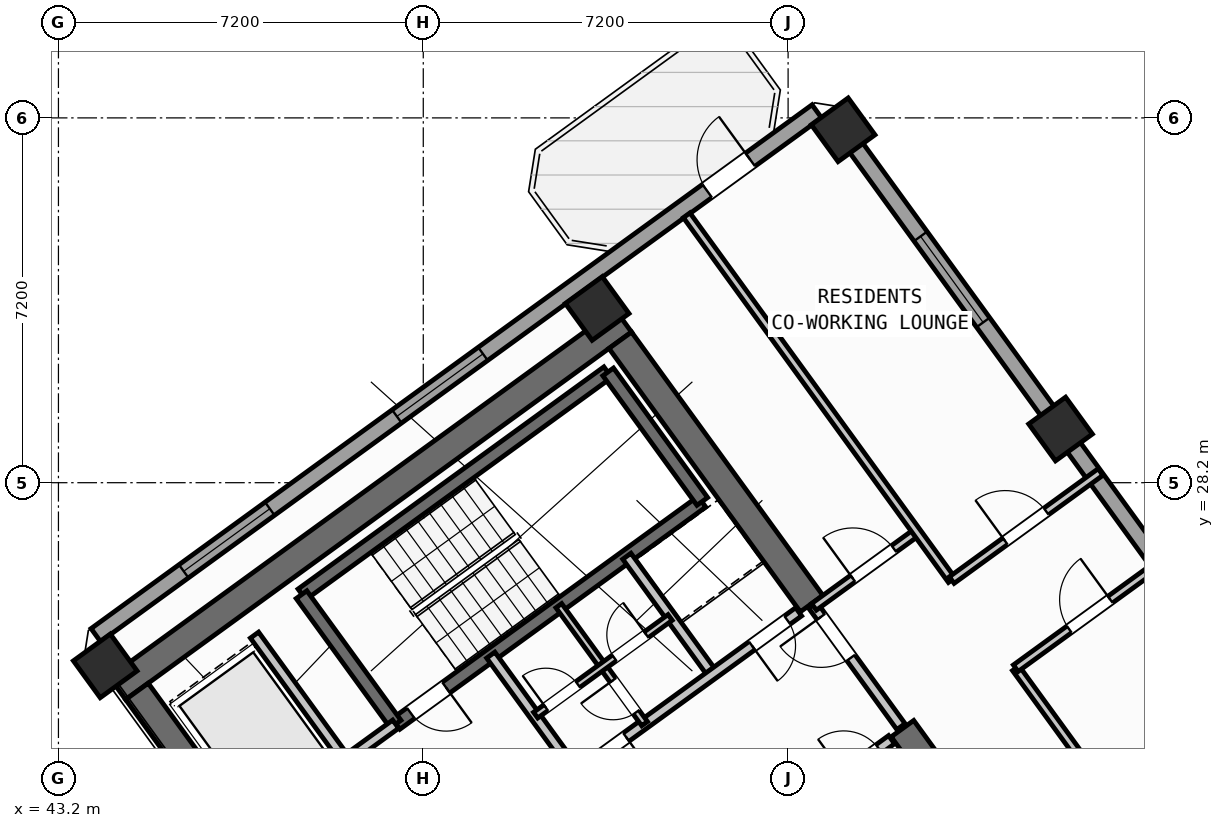
"""IFC4 building model, lengths in metres.
Left out: names, types, materials, properties, quantities, classifications, styles, units other than length and angle.
Written with IfcOpenShell. Run it as: python <this file> out.ifc"""

import sys

from ifc_helpers import new_model, si_unit, direction, frame, frame_2d, origin, origin_2d, place, context, subcontext, project, spatial, rectangle, hollow_rectangle, extrude, source, transform, mapped, element, fill, save


model = new_model("IFC4")
c1 = context("Model", 3, precision=1e-05, world=origin(), true_north=direction((0.0, 1.0)))
c2 = subcontext(c1, "Body", "Model", "MODEL_VIEW")
j1 = project(units=[si_unit("LENGTHUNIT", "METRE"), si_unit("PLANEANGLEUNIT", "RADIAN")], contexts=[c1])
p1 = place(None, origin())
s1 = spatial("IfcSite", under=j1, at=p1, CompositionType="ELEMENT")
p2 = place(p1, origin())
s2 = spatial("IfcBuilding", under=s1, at=p2, CompositionType="ELEMENT")
p3 = place(p2, frame((0.0, 0.0, 144.3)))
s3 = spatial("IfcBuildingStorey", under=s2, at=p3, CompositionType="ELEMENT", Elevation=144.3)
p4 = place(p3, frame((44.365, 24.142, 0.0), z_axis=(0.0, 0.0, 1.0), x_axis=(0.809024304885, 0.587775190107, 0.0)))
e1 = element("IfcWall", 1, at=p4, inside=s3, PredefinedType="SHEAR", context=c2, shape_type="SweptSolid", body=[
    extrude(rectangle(XDim=12.34, YDim=0.55, at=frame_2d((6.17, 0.0))), origin(), (0.0, 0.0, 1.0), 3.35),
])
p5 = place(p3, frame((48.526, 18.884, 0.0), z_axis=(0.0, 0.0, 1.0), x_axis=(-0.587764933797, 0.809031756236, 0.0)))
e2 = element("IfcWall", 2, at=p5, inside=s3, PredefinedType="SHEAR", context=c2, shape_type="SweptSolid", body=[
    extrude(rectangle(XDim=6.425, YDim=0.55, at=frame_2d((3.212, 0.0))), origin(), (0.0, 0.0, 1.0), 3.35),
])
p6 = place(p3, frame((61.958, 20.454, 0.0), z_axis=(0.0, 0.0, 1.0), x_axis=(-0.587802113096, 0.809004744015, 0.0)))
e3 = element("IfcWall", 3, at=p6, inside=s3, PredefinedType="SHEAR", context=c2, shape_type="SweptSolid", body=[
    extrude(rectangle(XDim=3.575, YDim=0.55, at=frame_2d((1.788, 0.0))), origin(), (0.0, 0.0, 1.0), 3.35),
])
p7 = place(p3, frame((58.064, 25.813, 0.0), z_axis=(0.0, 0.0, 1.0), x_axis=(-0.587764933797, 0.809031756236, 0.0)))
e4 = element("IfcWall", 4, at=p7, inside=s3, PredefinedType="SHEAR", context=c2, shape_type="SweptSolid", body=[
    extrude(rectangle(XDim=6.425, YDim=0.55, at=frame_2d((3.212, 0.0))), origin(), (0.0, 0.0, 1.0), 3.35),
])
m1 = source(origin(), c2, "Body", "SweptSolid", [
    extrude(hollow_rectangle(XDim=0.9, YDim=0.9, WallThickness=0.036, at=origin_2d()), origin(), (0.0, 0.0, 1.0), 3.6),
])
for number, where, z_axis, x_axis in (
    (5, (44.124, 24.585, 0.0), (0.0, 0.0, 1.0), (0.809, 0.588, 0.0)),
    (6, (53.832, 31.638, 0.0), (0.0, 0.0, 1.0), (0.809, 0.588, 0.0)),
    (7, (62.977, 29.259, 0.0), (0.0, 0.0, 1.0), (0.809, 0.588, 0.0)),
    (8, (58.686, 35.165, 0.0), (0.0, 0.0, 1.0), (0.809, 0.588, 0.0)),
):
    element("IfcColumn", number, at=place(p3, frame(where, z_axis=z_axis, x_axis=x_axis)), inside=s3, PredefinedType="COLUMN", context=c2, shape_type="MappedRepresentation", body=[
        mapped(m1, transform((0.0, 0.0, 0.0), scale=1.0)),
    ])
p8 = place(p3, frame((43.938, 25.192, 0.0), z_axis=(0.0, 0.0, 1.0), x_axis=(0.809016324578, 0.587786174187, 0.0)))
e9 = element("IfcWall", 9, at=p8, inside=s3, PredefinedType="STANDARD", context=c2, shape_type="SweptSolid", body=[
    extrude(rectangle(XDim=17.587, YDim=0.32, at=frame_2d((8.794, 0.0))), origin(), (0.0, 0.0, 1.0), 3.35),
])
p9 = place(p8, frame((14.914, 0.0, 0.0)))
e10 = element("IfcOpeningElement", 10, at=p9, cuts=e9, PredefinedType="OPENING", context=c2, shape_type="SweptSolid", body=[
    extrude(rectangle(XDim=1.05, YDim=2.15, at=frame_2d((0.525, 1.075))), frame((0.0, 0.17, 0.0), z_axis=(0.0, -1.0, 0.0), x_axis=(1.0, 0.0, 0.0)), (0.0, 0.0, 1.0), 0.34),
])
p10 = place(p8, frame((2.144, 0.0, 0.8)))
e11 = element("IfcOpeningElement", 11, at=p10, cuts=e9, PredefinedType="OPENING", context=c2, shape_type="SweptSolid", body=[
    extrude(rectangle(XDim=2.1, YDim=1.55, at=frame_2d((1.05, 0.775))), frame((0.0, 0.17, 0.0), z_axis=(0.0, -1.0, 0.0), x_axis=(1.0, 0.0, 0.0)), (0.0, 0.0, 1.0), 0.34),
])
p11 = place(p8, frame((7.344, 0.0, 0.8)))
e12 = element("IfcOpeningElement", 12, at=p11, cuts=e9, PredefinedType="OPENING", context=c2, shape_type="SweptSolid", body=[
    extrude(rectangle(XDim=2.1, YDim=1.55, at=frame_2d((1.05, 0.775))), frame((0.0, 0.17, 0.0), z_axis=(0.0, -1.0, 0.0), x_axis=(1.0, 0.0, 0.0)), (0.0, 0.0, 1.0), 0.34),
])
p12 = place(p3, frame((58.455, 35.484, 0.0), z_axis=(0.0, 0.0, 1.0), x_axis=(0.587783625747, -0.809018176127, 0.0)))
e13 = element("IfcWall", 13, at=p12, inside=s3, PredefinedType="STANDARD", context=c2, shape_type="SweptSolid", body=[
    extrude(rectangle(XDim=21.587, YDim=0.32, at=frame_2d((10.794, 0.0))), origin(), (0.0, 0.0, 1.0), 2.775),
])
p13 = place(p12, frame((2.994, 0.0, 0.8)))
e14 = element("IfcOpeningElement", 14, at=p13, cuts=e13, PredefinedType="OPENING", context=c2, shape_type="SweptSolid", body=[
    extrude(rectangle(XDim=2.1, YDim=1.55, at=frame_2d((1.05, 0.775))), frame((0.0, 0.17, 0.0), z_axis=(0.0, -1.0, 0.0), x_axis=(1.0, 0.0, 0.0)), (0.0, 0.0, 1.0), 0.34),
])
p14 = place(p12, frame((11.959, 0.0, 0.85)))
e15 = element("IfcOpeningElement", 15, at=p14, cuts=e13, PredefinedType="OPENING", context=c2, shape_type="SweptSolid", body=[
    extrude(rectangle(XDim=1.8, YDim=1.5, at=frame_2d((0.9, 0.75))), frame((0.0, 0.17, 0.0), z_axis=(0.0, -1.0, 0.0), x_axis=(1.0, 0.0, 0.0)), (0.0, 0.0, 1.0), 0.34),
])
p15 = place(p12, frame((18.56, 0.0, 0.85)))
e16 = element("IfcOpeningElement", 16, at=p15, cuts=e13, PredefinedType="OPENING", context=c2, shape_type="SweptSolid", body=[
    extrude(rectangle(XDim=1.5, YDim=1.5, at=frame_2d((0.75, 0.75))), frame((0.0, 0.17, 0.0), z_axis=(0.0, -1.0, 0.0), x_axis=(1.0, 0.0, 0.0)), (0.0, 0.0, 1.0), 0.34),
])
p16 = place(p3, frame((48.006, 25.996, 0.0), z_axis=(0.0, 0.0, 1.0), x_axis=(0.80901903764, 0.587782439969, 0.0)))
e17 = element("IfcWall", 17, at=p16, inside=s3, PredefinedType="SHEAR", context=c2, shape_type="SweptSolid", body=[
    extrude(rectangle(XDim=7.46, YDim=0.26, at=frame_2d((3.73, 0.0))), origin(), (0.0, 0.0, 1.0), 3.35),
])
p17 = place(p3, frame((49.863, 23.44, 0.0), z_axis=(0.0, 0.0, 1.0), x_axis=(0.809003474932, 0.587803859759, 0.0)))
e18 = element("IfcWall", 18, at=p17, inside=s3, PredefinedType="SHEAR", context=c2, shape_type="SweptSolid", body=[
    extrude(rectangle(XDim=7.46, YDim=0.26, at=frame_2d((3.73, 0.0))), origin(), (0.0, 0.0, 1.0), 3.35),
])
p18 = place(p17, frame((0.36, 0.0, 0.0)))
e19 = element("IfcOpeningElement", 19, at=p18, cuts=e18, PredefinedType="OPENING", context=c2, shape_type="SweptSolid", body=[
    extrude(rectangle(XDim=0.86, YDim=2.05, at=frame_2d((0.43, 1.025))), frame((0.0, 0.14, 0.0), z_axis=(0.0, -1.0, 0.0), x_axis=(1.0, 0.0, 0.0)), (0.0, 0.0, 1.0), 0.28),
])
p19 = place(p3, frame((49.855, 23.434, 0.0), z_axis=(0.0, 0.0, 1.0), x_axis=(-0.58776738483, 0.809029975545, 0.0)))
e20 = element("IfcWall", 20, at=p19, inside=s3, PredefinedType="SHEAR", context=c2, shape_type="SweptSolid", body=[
    extrude(rectangle(XDim=3.16, YDim=0.26, at=frame_2d((1.58, 0.0))), origin(), (0.0, 0.0, 1.0), 3.35),
])
p20 = place(p3, frame((55.906, 27.831, 0.0), z_axis=(0.0, 0.0, 1.0), x_axis=(-0.587804123638, 0.809003283204, 0.0)))
e21 = element("IfcWall", 21, at=p20, inside=s3, PredefinedType="SHEAR", context=c2, shape_type="SweptSolid", body=[
    extrude(rectangle(XDim=3.16, YDim=0.26, at=frame_2d((1.58, 0.0))), origin(), (0.0, 0.0, 1.0), 3.35),
])
p21 = place(p3, frame((47.065, 21.407, 0.0), z_axis=(0.0, 0.0, 1.0), x_axis=(0.809032984992, 0.587763242466, 0.0)))
e22 = element("IfcWall", 22, at=p21, inside=s3, PredefinedType="STANDARD", context=c2, shape_type="SweptSolid", body=[
    extrude(rectangle(XDim=3.448, YDim=0.2, at=frame_2d((1.724, 0.0))), origin(), (0.0, 0.0, 1.0), 3.34),
])
p22 = place(p21, frame((0.458, 0.0, 0.0)))
e23 = element("IfcOpeningElement", 23, at=p22, cuts=e22, PredefinedType="OPENING", context=c2, shape_type="SweptSolid", body=[
    extrude(rectangle(XDim=1.3, YDim=2.2, at=frame_2d((0.65, 1.1))), frame((0.0, 0.11, 0.0), z_axis=(0.0, -1.0, 0.0), x_axis=(1.0, 0.0, 0.0)), (0.0, 0.0, 1.0), 0.22),
])
p23 = place(p3, frame((56.553, 20.884, 0.0), z_axis=(0.0, 0.0, 1.0), x_axis=(0.809023564264, 0.58777620951, 0.0)))
e24 = element("IfcWall", 24, at=p23, inside=s3, PredefinedType="STANDARD", context=c2, shape_type="SweptSolid", body=[
    extrude(rectangle(XDim=3.818, YDim=0.2, at=frame_2d((1.909, 0.0))), origin(), (0.0, 0.0, 1.0), 3.34),
])
p24 = place(p23, frame((0.57, 0.0, 0.0)))
e25 = element("IfcOpeningElement", 25, at=p24, cuts=e24, PredefinedType="OPENING", context=c2, shape_type="SweptSolid", body=[
    extrude(rectangle(XDim=1.1, YDim=2.15, at=frame_2d((0.55, 1.075))), frame((0.0, 0.11, 0.0), z_axis=(0.0, -1.0, 0.0), x_axis=(1.0, 0.0, 0.0)), (0.0, 0.0, 1.0), 0.22),
])
p25 = place(p23, frame((2.65, 0.0, 0.0)))
e26 = element("IfcOpeningElement", 26, at=p25, cuts=e24, PredefinedType="OPENING", context=c2, shape_type="SweptSolid", body=[
    extrude(rectangle(XDim=0.86, YDim=2.05, at=frame_2d((0.43, 1.025))), frame((0.0, 0.11, 0.0), z_axis=(0.0, -1.0, 0.0), x_axis=(1.0, 0.0, 0.0)), (0.0, 0.0, 1.0), 0.22),
])
p26 = place(p3, frame((48.786, 22.83, 0.0), z_axis=(0.0, 0.0, 1.0), x_axis=(-0.587783856777, 0.809018008275, 0.0)))
e27 = element("IfcWall", 27, at=p26, inside=s3, PredefinedType="STANDARD", context=c2, shape_type="SweptSolid", body=[
    extrude(rectangle(XDim=2.92, YDim=0.2, at=frame_2d((1.46, 0.0))), origin(), (0.0, 0.0, 1.0), 3.34),
])
p27 = place(p3, frame((53.425, 22.468, 0.0), z_axis=(0.0, 0.0, 1.0), x_axis=(-0.5877230039, 0.809062216821, 0.0)))
e28 = element("IfcWall", 28, at=p27, inside=s3, PredefinedType="STANDARD", context=c2, shape_type="SweptSolid", body=[
    extrude(rectangle(XDim=2.88, YDim=0.2, at=frame_2d((1.44, 0.0))), origin(), (0.0, 0.0, 1.0), 3.34),
])
p28 = place(p3, frame((56.111, 24.419, 0.0), z_axis=(0.0, 0.0, 1.0), x_axis=(-0.58777848983, 0.809021907548, 0.0)))
e29 = element("IfcWall", 29, at=p28, inside=s3, PredefinedType="STANDARD", context=c2, shape_type="SweptSolid", body=[
    extrude(rectangle(XDim=2.88, YDim=0.2, at=frame_2d((1.44, 0.0))), origin(), (0.0, 0.0, 1.0), 3.34),
])
p29 = place(p3, frame((53.425, 22.468, 0.0), z_axis=(0.0, 0.0, 1.0), x_axis=(0.809024377198, 0.587775090574, 0.0)))
e30 = element("IfcWall", 30, at=p29, inside=s3, PredefinedType="STANDARD", context=c2, shape_type="SweptSolid", body=[
    extrude(rectangle(XDim=5.418, YDim=0.2, at=frame_2d((2.709, 0.0))), origin(), (0.0, 0.0, 1.0), 3.34),
])
p30 = place(p29, frame((4.28, 0.0, 0.0)))
e31 = element("IfcOpeningElement", 31, at=p30, cuts=e30, PredefinedType="OPENING", context=c2, shape_type="SweptSolid", body=[
    extrude(rectangle(XDim=0.86, YDim=2.05, at=frame_2d((0.43, 1.025))), frame((0.0, 0.11, 0.0), z_axis=(0.0, -1.0, 0.0), x_axis=(1.0, 0.0, 0.0)), (0.0, 0.0, 1.0), 0.22),
])
p31 = place(p29, frame((0.35, 0.0, 0.0)))
e32 = element("IfcOpeningElement", 32, at=p31, cuts=e30, PredefinedType="OPENING", context=c2, shape_type="SweptSolid", body=[
    extrude(rectangle(XDim=0.86, YDim=2.05, at=frame_2d((0.43, 1.025))), frame((0.0, 0.11, 0.0), z_axis=(0.0, -1.0, 0.0), x_axis=(1.0, 0.0, 0.0)), (0.0, 0.0, 1.0), 0.22),
])
p32 = place(p3, frame((54.768, 23.443, 0.0), z_axis=(0.0, 0.0, 1.0), x_axis=(-0.587736077749, 0.809052719489, 0.0)))
e33 = element("IfcWall", 33, at=p32, inside=s3, PredefinedType="PLUMBINGWALL", context=c2, shape_type="SweptSolid", body=[
    extrude(rectangle(XDim=1.4, YDim=0.14, at=frame_2d((0.7, 0.0))), origin(), (0.0, 0.0, 1.0), 3.34),
])
p33 = place(p32, frame((0.28, 0.0, 0.0)))
e34 = element("IfcOpeningElement", 34, at=p33, cuts=e33, PredefinedType="OPENING", context=c2, shape_type="SweptSolid", body=[
    extrude(rectangle(XDim=0.78, YDim=2.05, at=frame_2d((0.39, 1.025))), frame((0.0, 0.08, 0.0), z_axis=(0.0, -1.0, 0.0), x_axis=(1.0, 0.0, 0.0)), (0.0, 0.0, 1.0), 0.16),
])
p34 = place(p3, frame((53.945, 24.576, 0.0), z_axis=(0.0, 0.0, 1.0), x_axis=(-0.587897037186, 0.808935766095, 0.0)))
e35 = element("IfcWall", 35, at=p34, inside=s3, PredefinedType="PLUMBINGWALL", context=c2, shape_type="SweptSolid", body=[
    extrude(rectangle(XDim=1.48, YDim=0.14, at=frame_2d((0.74, 0.0))), origin(), (0.0, 0.0, 1.0), 3.34),
])
p35 = place(p3, frame((52.618, 23.612, 0.0), z_axis=(0.0, 0.0, 1.0), x_axis=(0.809009587469, 0.587795446889, 0.0)))
e36 = element("IfcWall", 36, at=p35, inside=s3, PredefinedType="PLUMBINGWALL", context=c2, shape_type="SweptSolid", body=[
    extrude(rectangle(XDim=3.28, YDim=0.14, at=frame_2d((1.64, 0.0))), origin(), (0.0, 0.0, 1.0), 3.34),
])
p36 = place(p35, frame((0.25, 0.0, 0.0)))
e37 = element("IfcOpeningElement", 37, at=p36, cuts=e36, PredefinedType="OPENING", context=c2, shape_type="SweptSolid", body=[
    extrude(rectangle(XDim=0.78, YDim=2.05, at=frame_2d((0.39, 1.025))), frame((0.0, 0.08, 0.0), z_axis=(0.0, -1.0, 0.0), x_axis=(1.0, 0.0, 0.0)), (0.0, 0.0, 1.0), 0.16),
])
p37 = place(p35, frame((1.92, 0.0, 0.0)))
e38 = element("IfcOpeningElement", 38, at=p37, cuts=e36, PredefinedType="OPENING", context=c2, shape_type="SweptSolid", body=[
    extrude(rectangle(XDim=0.78, YDim=2.05, at=frame_2d((0.39, 1.025))), frame((0.0, 0.08, 0.0), z_axis=(0.0, -1.0, 0.0), x_axis=(1.0, 0.0, 0.0)), (0.0, 0.0, 1.0), 0.16),
])
p38 = place(p3, frame((59.827, 23.386, 0.0), z_axis=(0.0, 0.0, 1.0), x_axis=(-0.587803840107, 0.809003489211, 0.0)))
e39 = element("IfcWall", 39, at=p38, inside=s3, PredefinedType="STANDARD", context=c2, shape_type="SweptSolid", body=[
    extrude(rectangle(XDim=2.96, YDim=0.2, at=frame_2d((1.48, 0.0))), origin(), (0.0, 0.0, 1.0), 3.34),
])
p39 = place(p38, frame((1.68, 0.0, 0.0)))
e40 = element("IfcOpeningElement", 40, at=p39, cuts=e39, PredefinedType="OPENING", context=c2, shape_type="SweptSolid", body=[
    extrude(rectangle(XDim=1.0, YDim=2.1, at=frame_2d((0.5, 1.05))), frame((0.0, 0.11, 0.0), z_axis=(0.0, -1.0, 0.0), x_axis=(1.0, 0.0, 0.0)), (0.0, 0.0, 1.0), 0.22),
])
p40 = place(p3, frame((58.111, 25.749, 0.0), z_axis=(0.0, 0.0, 1.0), x_axis=(0.809000999347, 0.58780726693, 0.0)))
e41 = element("IfcWall", 41, at=p40, inside=s3, PredefinedType="PARTITIONING", context=c2, shape_type="SweptSolid", body=[
    extrude(rectangle(XDim=2.51, YDim=0.16, at=frame_2d((1.255, 0.0))), origin(), (0.0, 0.0, 1.0), 2.775),
])
p41 = place(p40, frame((0.95, 0.0, 0.0)))
e42 = element("IfcOpeningElement", 42, at=p41, cuts=e41, PredefinedType="OPENING", context=c2, shape_type="SweptSolid", body=[
    extrude(rectangle(XDim=1.0, YDim=2.1, at=frame_2d((0.5, 1.05))), frame((0.0, 0.09, 0.0), z_axis=(0.0, -1.0, 0.0), x_axis=(1.0, 0.0, 0.0)), (0.0, 0.0, 1.0), 0.18),
])
p42 = place(p3, frame((68.353, 15.922, 0.0), z_axis=(0.0, 0.0, 1.0), x_axis=(-0.587783168305, 0.809018508476, 0.0)))
e43 = element("IfcWall", 43, at=p42, inside=s3, PredefinedType="PARTITIONING", context=c2, shape_type="SweptSolid", body=[
    extrude(rectangle(XDim=10.65, YDim=0.16, at=frame_2d((5.325, 0.0))), origin(), (0.0, 0.0, 1.0), 3.34),
])
p43 = place(p3, frame((60.829, 26.278, 0.0), z_axis=(0.0, 0.0, 1.0), x_axis=(-0.587781800813, 0.80901950201, 0.0)))
e44 = element("IfcWall", 44, at=p43, inside=s3, PredefinedType="PARTITIONING", context=c2, shape_type="SweptSolid", body=[
    extrude(rectangle(XDim=8.9, YDim=0.16, at=frame_2d((4.45, 0.0))), origin(), (0.0, 0.0, 1.0), 3.34),
])
p44 = place(p3, frame((62.093, 24.538, 0.0), z_axis=(0.0, 0.0, 1.0), x_axis=(0.809035546126, 0.58775971715, 0.0)))
e45 = element("IfcWall", 45, at=p44, inside=s3, PredefinedType="PARTITIONING", context=c2, shape_type="SweptSolid", body=[
    extrude(rectangle(XDim=3.63, YDim=0.16, at=frame_2d((1.815, 0.0))), origin(), (0.0, 0.0, 1.0), 3.34),
])
p45 = place(p44, frame((1.305, 0.0, 0.0)))
e46 = element("IfcOpeningElement", 46, at=p45, cuts=e45, PredefinedType="OPENING", context=c2, shape_type="SweptSolid", body=[
    extrude(rectangle(XDim=1.0, YDim=2.1, at=frame_2d((0.5, 1.05))), frame((0.0, 0.09, 0.0), z_axis=(0.0, -1.0, 0.0), x_axis=(1.0, 0.0, 0.0)), (0.0, 0.0, 1.0), 0.18),
])
p46 = place(p3, frame((60.829, 26.278, 0.0), z_axis=(0.0, 0.0, 1.0), x_axis=(0.809003564202, 0.587803736896, 0.0)))
e47 = element("IfcWall", 47, at=p46, inside=s3, PredefinedType="PARTITIONING", context=c2, shape_type="SweptSolid", body=[
    extrude(rectangle(XDim=3.63, YDim=0.16, at=frame_2d((1.815, 0.0))), origin(), (0.0, 0.0, 1.0), 3.34),
])
p47 = place(p46, frame((1.305, 0.0, 0.0)))
e48 = element("IfcOpeningElement", 48, at=p47, cuts=e47, PredefinedType="OPENING", context=c2, shape_type="SweptSolid", body=[
    extrude(rectangle(XDim=1.0, YDim=2.1, at=frame_2d((0.5, 1.05))), frame((0.0, 0.09, 0.0), z_axis=(0.0, -1.0, 0.0), x_axis=(1.0, 0.0, 0.0)), (0.0, 0.0, 1.0), 0.18),
])
m2 = source(origin(), c2, "Body", "SweptSolid", [
    extrude(rectangle(XDim=1.05, YDim=2.15, at=frame_2d((0.525, 1.075))), frame((0.0, 0.025, 0.0), z_axis=(0.0, -1.0, 0.0), x_axis=(1.0, 0.0, 0.0)), (0.0, 0.0, 1.0), 0.05),
])
p48 = place(p9, origin())
e49 = element("IfcDoor", 49, at=p48, inside=s3, OperationType="SINGLE_SWING_RIGHT", PredefinedType="DOOR", context=c2, shape_type="MappedRepresentation", body=[
    mapped(m2, transform((0.0, 0.0, 0.0), scale=1.0)),
])
fill(e10, e49)
m3 = source(origin(), c2, "Body", "SweptSolid", [
    extrude(rectangle(XDim=2.1, YDim=1.55, at=frame_2d((1.05, 0.775))), frame((0.0, 0.03, 0.0), z_axis=(0.0, -1.0, 0.0), x_axis=(1.0, 0.0, 0.0)), (0.0, 0.0, 1.0), 0.06),
])
p49 = place(p10, origin())
e50 = element("IfcWindow", 50, at=p49, inside=s3, PartitioningType="SINGLE_PANEL", PredefinedType="WINDOW", context=c2, shape_type="MappedRepresentation", body=[
    mapped(m3, transform((0.0, 0.0, 0.0), scale=1.0)),
])
fill(e11, e50)
p50 = place(p11, origin())
e51 = element("IfcWindow", 51, at=p50, inside=s3, PartitioningType="SINGLE_PANEL", PredefinedType="WINDOW", context=c2, shape_type="MappedRepresentation", body=[
    mapped(m3, transform((0.0, 0.0, 0.0), scale=1.0)),
])
fill(e12, e51)
p51 = place(p13, origin())
e52 = element("IfcWindow", 52, at=p51, inside=s3, PartitioningType="SINGLE_PANEL", PredefinedType="WINDOW", context=c2, shape_type="MappedRepresentation", body=[
    mapped(m3, transform((0.0, 0.0, 0.0), scale=1.0)),
])
fill(e14, e52)
m4 = source(origin(), c2, "Body", "SweptSolid", [
    extrude(rectangle(XDim=0.86, YDim=2.05, at=frame_2d((0.43, 1.025))), frame((0.0, 0.025, 0.0), z_axis=(0.0, -1.0, 0.0), x_axis=(1.0, 0.0, 0.0)), (0.0, 0.0, 1.0), 0.05),
])
p52 = place(p18, frame((0.86, 0.0, 0.0), z_axis=(0.0, 0.0, 1.0), x_axis=(-1.0, 0.0, 0.0)))
e53 = element("IfcDoor", 53, at=p52, inside=s3, OperationType="SINGLE_SWING_LEFT", PredefinedType="DOOR", context=c2, shape_type="MappedRepresentation", body=[
    mapped(m4, transform((0.0, 0.0, 0.0), scale=1.0)),
])
fill(e19, e53)
p53 = place(p30, frame((0.86, 0.0, 0.0), z_axis=(0.0, 0.0, 1.0), x_axis=(-1.0, 0.0, 0.0)))
e54 = element("IfcDoor", 54, at=p53, inside=s3, OperationType="SINGLE_SWING_RIGHT", PredefinedType="DOOR", context=c2, shape_type="MappedRepresentation", body=[
    mapped(m4, transform((0.0, 0.0, 0.0), scale=1.0)),
])
fill(e31, e54)
p54 = place(p31, frame((0.86, 0.0, 0.0), z_axis=(0.0, 0.0, 1.0), x_axis=(-1.0, 0.0, 0.0)))
e55 = element("IfcDoor", 55, at=p54, inside=s3, OperationType="SINGLE_SWING_LEFT", PredefinedType="DOOR", context=c2, shape_type="MappedRepresentation", body=[
    mapped(m4, transform((0.0, 0.0, 0.0), scale=1.0)),
])
fill(e32, e55)
m5 = source(origin(), c2, "Body", "SweptSolid", [
    extrude(rectangle(XDim=0.78, YDim=2.05, at=frame_2d((0.39, 1.025))), frame((0.0, 0.025, 0.0), z_axis=(0.0, -1.0, 0.0), x_axis=(1.0, 0.0, 0.0)), (0.0, 0.0, 1.0), 0.05),
])
p55 = place(p33, origin())
e56 = element("IfcDoor", 56, at=p55, inside=s3, OperationType="SINGLE_SWING_RIGHT", PredefinedType="DOOR", context=c2, shape_type="MappedRepresentation", body=[
    mapped(m5, transform((0.0, 0.0, 0.0), scale=1.0)),
])
fill(e34, e56)
p56 = place(p36, origin())
e57 = element("IfcDoor", 57, at=p56, inside=s3, OperationType="SINGLE_SWING_LEFT", PredefinedType="DOOR", context=c2, shape_type="MappedRepresentation", body=[
    mapped(m5, transform((0.0, 0.0, 0.0), scale=1.0)),
])
fill(e37, e57)
p57 = place(p37, origin())
e58 = element("IfcDoor", 58, at=p57, inside=s3, OperationType="SINGLE_SWING_RIGHT", PredefinedType="DOOR", context=c2, shape_type="MappedRepresentation", body=[
    mapped(m5, transform((0.0, 0.0, 0.0), scale=1.0)),
])
fill(e38, e58)
m6 = source(origin(), c2, "Body", "SweptSolid", [
    extrude(rectangle(XDim=1.0, YDim=2.1, at=frame_2d((0.5, 1.05))), frame((0.0, 0.025, 0.0), z_axis=(0.0, -1.0, 0.0), x_axis=(1.0, 0.0, 0.0)), (0.0, 0.0, 1.0), 0.05),
])
p58 = place(p41, origin())
e59 = element("IfcDoor", 59, at=p58, inside=s3, OperationType="SINGLE_SWING_LEFT", PredefinedType="DOOR", context=c2, shape_type="MappedRepresentation", body=[
    mapped(m6, transform((0.0, 0.0, 0.0), scale=1.0)),
])
fill(e42, e59)
p59 = place(p39, origin())
e60 = element("IfcDoor", 60, at=p59, inside=s3, OperationType="SINGLE_SWING_RIGHT", PredefinedType="DOOR", context=c2, shape_type="MappedRepresentation", body=[
    mapped(m6, transform((0.0, 0.0, 0.0), scale=1.0)),
])
fill(e40, e60)
p60 = place(p47, origin())
e61 = element("IfcDoor", 61, at=p60, inside=s3, OperationType="SINGLE_SWING_LEFT", PredefinedType="DOOR", context=c2, shape_type="MappedRepresentation", body=[
    mapped(m6, transform((0.0, 0.0, 0.0), scale=1.0)),
])
fill(e48, e61)
p61 = place(p45, origin())
e62 = element("IfcDoor", 62, at=p61, inside=s3, OperationType="SINGLE_SWING_RIGHT", PredefinedType="DOOR", context=c2, shape_type="MappedRepresentation", body=[
    mapped(m6, transform((0.0, 0.0, 0.0), scale=1.0)),
])
fill(e46, e62)
save(model, sys.argv[1])
